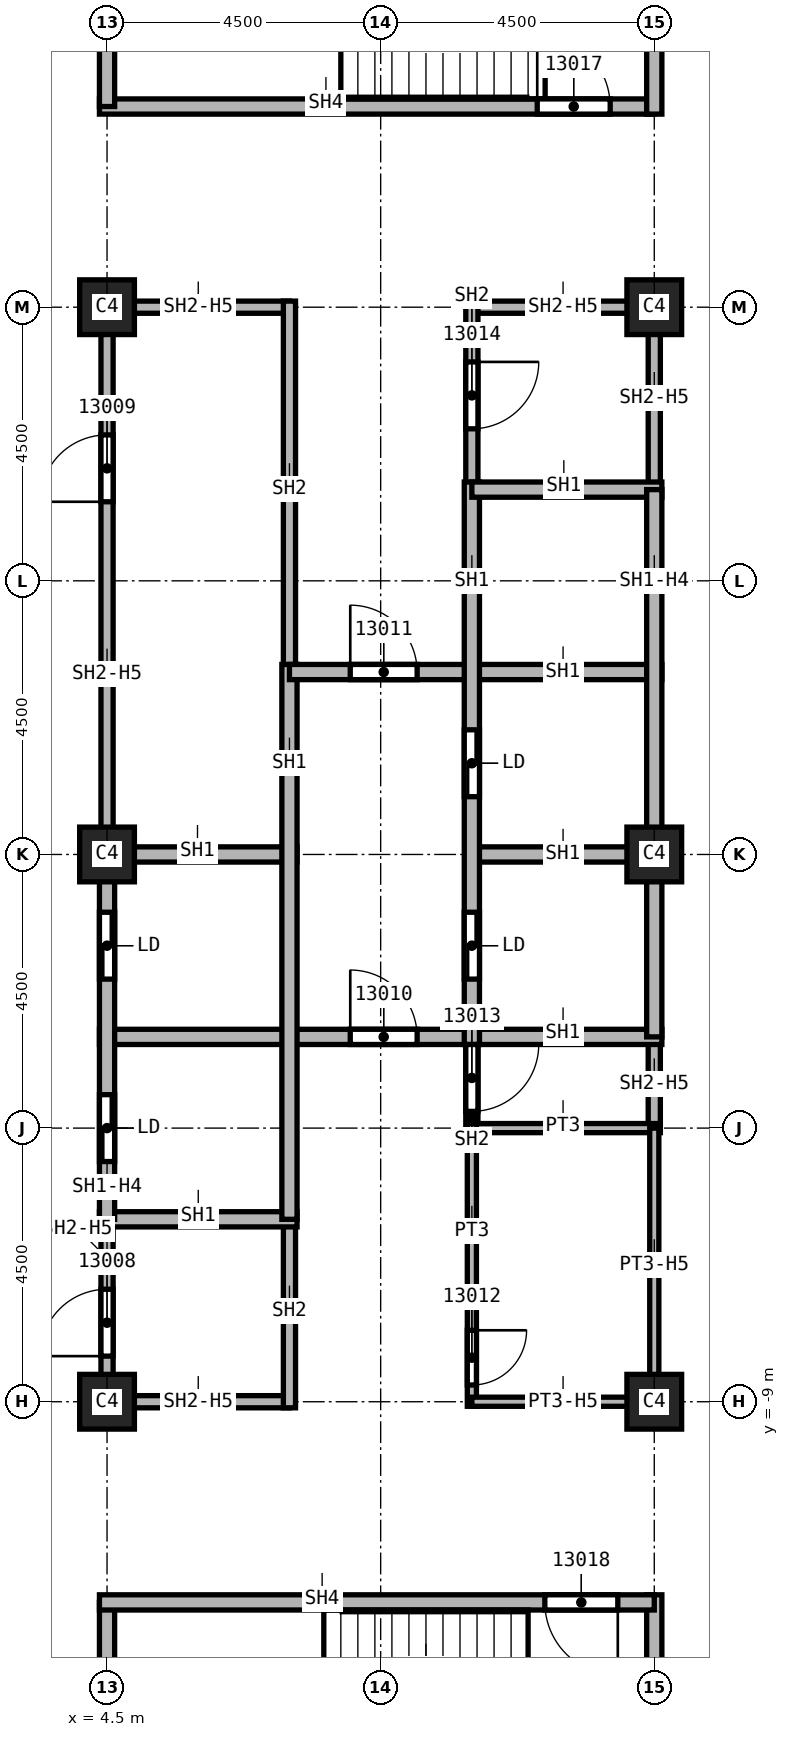
"""IFC4 building model, lengths in metres.
Left out: names, types, materials, properties, quantities, classifications, styles, units other than length and angle.
Written with IfcOpenShell. Run it as: python <this file> out.ifc"""

import sys

from ifc_helpers import new_model, si_unit, direction, frame, frame_2d, origin, origin_2d, place, context, subcontext, project, spatial, rectangle, extrude, element, fill, save


model = new_model("IFC4")
c1 = context("Model", 3, precision=1e-05, world=origin(), true_north=direction((0.0, 1.0)))
c2 = subcontext(c1, "Body", "Model", "MODEL_VIEW")
j1 = project(units=[si_unit("LENGTHUNIT", "METRE"), si_unit("PLANEANGLEUNIT", "RADIAN")], contexts=[c1])
p1 = place(None, origin())
s1 = spatial("IfcSite", under=j1, at=p1, CompositionType="ELEMENT")
p2 = place(p1, origin())
s2 = spatial("IfcBuilding", under=s1, at=p2, CompositionType="ELEMENT")
p3 = place(p2, frame((0.0, 0.0, 208.0)))
s3 = spatial("IfcBuildingStorey", under=s2, at=p3, CompositionType="ELEMENT", Elevation=208.0)
for number, where, z_axis, x_axis in (
    (1, (4.5, 0.0, 0.0), (0.0, 0.0, 1.0), (1.0, 0.0, 0.0)),
    (2, (4.5, 9.0, 0.0), (0.0, 0.0, 1.0), (1.0, 0.0, 0.0)),
    (3, (4.5, -9.0, 0.0), (0.0, 0.0, 1.0), (1.0, 0.0, 0.0)),
    (4, (13.5, 0.0, 0.0), (0.0, 0.0, 1.0), (1.0, 0.0, 0.0)),
    (5, (13.5, 9.0, 0.0), (0.0, 0.0, 1.0), (1.0, 0.0, 0.0)),
    (6, (13.5, -9.0, 0.0), (0.0, 0.0, 1.0), (1.0, 0.0, 0.0)),
):
    element("IfcColumn", number, at=place(p3, frame(where, z_axis=z_axis, x_axis=x_axis)), inside=s3, PredefinedType="COLUMN", context=c2, shape_type="SweptSolid", body=[
        extrude(rectangle(XDim=0.9, YDim=0.9, at=origin_2d()), origin(), (0.0, 0.0, 1.0), 3.72),
    ])
p4 = place(p3, frame((4.5, -9.1, 0.0), z_axis=(0.0, 0.0, 1.0), x_axis=(0.0, 1.0, 0.0)))
e7 = element("IfcWall", 7, at=p4, inside=s3, PredefinedType="SOLIDWALL", context=c2, shape_type="SweptSolid", body=[
    extrude(rectangle(XDim=3.1, YDim=0.2, at=frame_2d((1.55, 0.0))), origin(), (0.0, 0.0, 1.0), 2.958),
])
p5 = place(p4, frame((0.85, 0.0, 0.0)))
e8 = element("IfcOpeningElement", 8, at=p5, cuts=e7, PredefinedType="OPENING", context=c2, shape_type="SweptSolid", body=[
    extrude(rectangle(XDim=1.1, YDim=2.1, at=frame_2d((0.55, 1.05))), frame((0.0, 0.1, 0.0), z_axis=(0.0, -1.0, 0.0), x_axis=(1.0, 0.0, 0.0)), (0.0, 0.0, 1.0), 0.2),
])
p6 = place(p3, frame((4.5, 0.0, 0.0), z_axis=(0.0, 0.0, 1.0), x_axis=(0.0, 1.0, 0.0)))
e9 = element("IfcWall", 9, at=p6, inside=s3, PredefinedType="SOLIDWALL", context=c2, shape_type="SweptSolid", body=[
    extrude(rectangle(XDim=9.1, YDim=0.2, at=frame_2d((4.55, 0.0))), origin(), (0.0, 0.0, 1.0), 2.958),
])
p7 = place(p6, frame((5.8, 0.0, 0.0)))
e10 = element("IfcOpeningElement", 10, at=p7, cuts=e9, PredefinedType="OPENING", context=c2, shape_type="SweptSolid", body=[
    extrude(rectangle(XDim=1.1, YDim=2.1, at=frame_2d((0.55, 1.05))), frame((0.0, 0.1, 0.0), z_axis=(0.0, -1.0, 0.0), x_axis=(1.0, 0.0, 0.0)), (0.0, 0.0, 1.0), 0.2),
])
for number, where, z_axis, x_axis in (
    (11, (4.5, 9.0, 0.0), (0.0, 0.0, 1.0), (1.0, 0.0, 0.0)),
    (12, (7.5, -9.0, 0.0), (0.0, 0.0, 1.0), (-1.0, 0.0, 0.0)),
):
    element("IfcWall", number, at=place(p3, frame(where, z_axis=z_axis, x_axis=x_axis)), inside=s3, PredefinedType="SOLIDWALL", context=c2, shape_type="SweptSolid", body=[
        extrude(rectangle(XDim=3.0, YDim=0.2, at=frame_2d((1.5, 0.0))), origin(), (0.0, 0.0, 1.0), 2.958),
    ])
p8 = place(p3, frame((7.5, -6.0, 0.0), z_axis=(0.0, 0.0, 1.0), x_axis=(0.0, -1.0, 0.0)))
e13 = element("IfcWall", 13, at=p8, inside=s3, PredefinedType="SOLIDWALL", context=c2, shape_type="SweptSolid", body=[
    extrude(rectangle(XDim=3.1, YDim=0.2, at=frame_2d((1.55, 0.0))), origin(), (0.0, 0.0, 1.0), 3.72),
])
p9 = place(p3, frame((7.5, 9.1, 0.0), z_axis=(0.0, 0.0, 1.0), x_axis=(0.0, -1.0, 0.0)))
e14 = element("IfcWall", 14, at=p9, inside=s3, PredefinedType="SOLIDWALL", context=c2, shape_type="SweptSolid", body=[
    extrude(rectangle(XDim=6.225, YDim=0.2, at=frame_2d((3.113, 0.0))), origin(), (0.0, 0.0, 1.0), 3.72),
])
p10 = place(p3, frame((10.5, -2.875, 0.0), z_axis=(0.0, 0.0, 1.0), x_axis=(0.0, -1.0, 0.0)))
e15 = element("IfcWall", 15, at=p10, inside=s3, PredefinedType="SOLIDWALL", context=c2, shape_type="SweptSolid", body=[
    extrude(rectangle(XDim=1.7, YDim=0.2, at=frame_2d((0.85, 0.0))), origin(), (0.0, 0.0, 1.0), 3.72),
])
p11 = place(p10, frame((0.25, 0.0, 0.0)))
e16 = element("IfcOpeningElement", 16, at=p11, cuts=e15, PredefinedType="OPENING", context=c2, shape_type="SweptSolid", body=[
    extrude(rectangle(XDim=1.1, YDim=2.1, at=frame_2d((0.55, 1.05))), frame((0.0, 0.1, 0.0), z_axis=(0.0, -1.0, 0.0), x_axis=(1.0, 0.0, 0.0)), (0.0, 0.0, 1.0), 0.2),
])
p12 = place(p3, frame((10.5, 9.0, 0.0), z_axis=(0.0, 0.0, 1.0), x_axis=(1.0, 0.0, 0.0)))
e17 = element("IfcWall", 17, at=p12, inside=s3, PredefinedType="SOLIDWALL", context=c2, shape_type="SweptSolid", body=[
    extrude(rectangle(XDim=3.0, YDim=0.2, at=frame_2d((1.5, 0.0))), origin(), (0.0, 0.0, 1.0), 2.958),
])
p13 = place(p3, frame((10.5, 9.1, 0.0), z_axis=(0.0, 0.0, 1.0), x_axis=(0.0, -1.0, 0.0)))
e18 = element("IfcWall", 18, at=p13, inside=s3, PredefinedType="SOLIDWALL", context=c2, shape_type="SweptSolid", body=[
    extrude(rectangle(XDim=3.225, YDim=0.2, at=frame_2d((1.613, 0.0))), origin(), (0.0, 0.0, 1.0), 3.72),
])
p14 = place(p13, frame((1.0, 0.0, 0.0)))
e19 = element("IfcOpeningElement", 19, at=p14, cuts=e18, PredefinedType="OPENING", context=c2, shape_type="SweptSolid", body=[
    extrude(rectangle(XDim=1.1, YDim=2.1, at=frame_2d((0.55, 1.05))), frame((0.0, 0.1, 0.0), z_axis=(0.0, -1.0, 0.0), x_axis=(1.0, 0.0, 0.0)), (0.0, 0.0, 1.0), 0.2),
])
p15 = place(p3, frame((13.5, -3.0, 0.0), z_axis=(0.0, 0.0, 1.0), x_axis=(0.0, -1.0, 0.0)))
e20 = element("IfcWall", 20, at=p15, inside=s3, PredefinedType="SOLIDWALL", context=c2, shape_type="SweptSolid", body=[
    extrude(rectangle(XDim=1.5, YDim=0.2, at=frame_2d((0.75, 0.0))), origin(), (0.0, 0.0, 1.0), 2.958),
])
p16 = place(p3, frame((13.5, 9.1, 0.0), z_axis=(0.0, 0.0, 1.0), x_axis=(0.0, -1.0, 0.0)))
e21 = element("IfcWall", 21, at=p16, inside=s3, PredefinedType="SOLIDWALL", context=c2, shape_type="SweptSolid", body=[
    extrude(rectangle(XDim=3.1, YDim=0.2, at=frame_2d((1.55, 0.0))), origin(), (0.0, 0.0, 1.0), 2.958),
])
p17 = place(p3, frame((4.375, -6.0, 0.0), z_axis=(0.0, 0.0, 1.0), x_axis=(1.0, 0.0, 0.0)))
e22 = element("IfcWall", 22, at=p17, inside=s3, PredefinedType="SOLIDWALL", context=c2, shape_type="SweptSolid", body=[
    extrude(rectangle(XDim=3.25, YDim=0.25, at=frame_2d((1.625, 0.0))), origin(), (0.0, 0.0, 1.0), 3.72),
])
p18 = place(p3, frame((4.375, -3.0, 0.0), z_axis=(0.0, 0.0, 1.0), x_axis=(1.0, 0.0, 0.0)))
e23 = element("IfcWall", 23, at=p18, inside=s3, PredefinedType="SOLIDWALL", context=c2, shape_type="SweptSolid", body=[
    extrude(rectangle(XDim=9.25, YDim=0.25, at=frame_2d((4.625, 0.0))), origin(), (0.0, 0.0, 1.0), 3.72),
])
p19 = place(p18, frame((4.125, 0.0, 0.0)))
e24 = element("IfcOpeningElement", 24, at=p19, cuts=e23, PredefinedType="OPENING", context=c2, shape_type="SweptSolid", body=[
    extrude(rectangle(XDim=1.1, YDim=2.1, at=frame_2d((0.55, 1.05))), frame((0.0, 0.125, 0.0), z_axis=(0.0, -1.0, 0.0), x_axis=(1.0, 0.0, 0.0)), (0.0, 0.0, 1.0), 0.25),
])
p20 = place(p3, frame((4.375, 0.0, 0.0), z_axis=(0.0, 0.0, 1.0), x_axis=(1.0, 0.0, 0.0)))
e25 = element("IfcWall", 25, at=p20, inside=s3, PredefinedType="SOLIDWALL", context=c2, shape_type="SweptSolid", body=[
    extrude(rectangle(XDim=3.25, YDim=0.25, at=frame_2d((1.625, 0.0))), origin(), (0.0, 0.0, 1.0), 3.72),
])
p21 = place(p3, frame((4.5, -6.0, 0.0), z_axis=(0.0, 0.0, 1.0), x_axis=(0.0, 1.0, 0.0)))
e26 = element("IfcWall", 26, at=p21, inside=s3, PredefinedType="SOLIDWALL", context=c2, shape_type="SweptSolid", body=[
    extrude(rectangle(XDim=6.0, YDim=0.25, at=frame_2d((3.0, 0.0))), origin(), (0.0, 0.0, 1.0), 2.958),
])
p22 = place(p21, frame((0.95, 0.0, 0.0)))
e27 = element("IfcOpeningElement", 27, at=p22, cuts=e26, PredefinedType="OPENING", context=c2, shape_type="SweptSolid", body=[
    extrude(rectangle(XDim=1.1, YDim=2.1, at=frame_2d((0.55, 1.05))), frame((0.0, 0.125, 0.0), z_axis=(0.0, -1.0, 0.0), x_axis=(1.0, 0.0, 0.0)), (0.0, 0.0, 1.0), 0.25),
])
p23 = place(p21, frame((3.95, 0.0, 0.0)))
e28 = element("IfcOpeningElement", 28, at=p23, cuts=e26, PredefinedType="OPENING", context=c2, shape_type="SweptSolid", body=[
    extrude(rectangle(XDim=1.1, YDim=2.1, at=frame_2d((0.55, 1.05))), frame((0.0, 0.125, 0.0), z_axis=(0.0, -1.0, 0.0), x_axis=(1.0, 0.0, 0.0)), (0.0, 0.0, 1.0), 0.25),
])
p24 = place(p3, frame((7.5, 3.125, 0.0), z_axis=(0.0, 0.0, 1.0), x_axis=(0.0, -1.0, 0.0)))
e29 = element("IfcWall", 29, at=p24, inside=s3, PredefinedType="SOLIDWALL", context=c2, shape_type="SweptSolid", body=[
    extrude(rectangle(XDim=9.125, YDim=0.25, at=frame_2d((4.562, 0.0))), origin(), (0.0, 0.0, 1.0), 3.72),
])
p25 = place(p3, frame((7.5, 3.0, 0.0), z_axis=(0.0, 0.0, 1.0), x_axis=(1.0, 0.0, 0.0)))
e30 = element("IfcWall", 30, at=p25, inside=s3, PredefinedType="SOLIDWALL", context=c2, shape_type="SweptSolid", body=[
    extrude(rectangle(XDim=6.125, YDim=0.25, at=frame_2d((3.062, 0.0))), origin(), (0.0, 0.0, 1.0), 3.72),
])
p26 = place(p25, frame((1.0, 0.0, 0.0)))
e31 = element("IfcOpeningElement", 31, at=p26, cuts=e30, PredefinedType="OPENING", context=c2, shape_type="SweptSolid", body=[
    extrude(rectangle(XDim=1.1, YDim=2.1, at=frame_2d((0.55, 1.05))), frame((0.0, 0.125, 0.0), z_axis=(0.0, -1.0, 0.0), x_axis=(1.0, 0.0, 0.0)), (0.0, 0.0, 1.0), 0.25),
])
p27 = place(p3, frame((10.5, 0.0, 0.0), z_axis=(0.0, 0.0, 1.0), x_axis=(1.0, 0.0, 0.0)))
e32 = element("IfcWall", 32, at=p27, inside=s3, PredefinedType="SOLIDWALL", context=c2, shape_type="SweptSolid", body=[
    extrude(rectangle(XDim=3.125, YDim=0.25, at=frame_2d((1.562, 0.0))), origin(), (0.0, 0.0, 1.0), 3.72),
])
p28 = place(p3, frame((10.5, 6.125, 0.0), z_axis=(0.0, 0.0, 1.0), x_axis=(0.0, -1.0, 0.0)))
e33 = element("IfcWall", 33, at=p28, inside=s3, PredefinedType="SOLIDWALL", context=c2, shape_type="SweptSolid", body=[
    extrude(rectangle(XDim=9.25, YDim=0.25, at=frame_2d((4.625, 0.0))), origin(), (0.0, 0.0, 1.0), 3.72),
])
p29 = place(p28, frame((7.075, 0.0, 0.0)))
e34 = element("IfcOpeningElement", 34, at=p29, cuts=e33, PredefinedType="OPENING", context=c2, shape_type="SweptSolid", body=[
    extrude(rectangle(XDim=1.1, YDim=2.1, at=frame_2d((0.55, 1.05))), frame((0.0, 0.125, 0.0), z_axis=(0.0, -1.0, 0.0), x_axis=(1.0, 0.0, 0.0)), (0.0, 0.0, 1.0), 0.25),
])
p30 = place(p28, frame((4.075, 0.0, 0.0)))
e35 = element("IfcOpeningElement", 35, at=p30, cuts=e33, PredefinedType="OPENING", context=c2, shape_type="SweptSolid", body=[
    extrude(rectangle(XDim=1.1, YDim=2.1, at=frame_2d((0.55, 1.05))), frame((0.0, 0.125, 0.0), z_axis=(0.0, -1.0, 0.0), x_axis=(1.0, 0.0, 0.0)), (0.0, 0.0, 1.0), 0.25),
])
p31 = place(p3, frame((10.5, 6.0, 0.0), z_axis=(0.0, 0.0, 1.0), x_axis=(1.0, 0.0, 0.0)))
e36 = element("IfcWall", 36, at=p31, inside=s3, PredefinedType="SOLIDWALL", context=c2, shape_type="SweptSolid", body=[
    extrude(rectangle(XDim=3.125, YDim=0.25, at=frame_2d((1.562, 0.0))), origin(), (0.0, 0.0, 1.0), 3.72),
])
p32 = place(p3, frame((13.5, 6.0, 0.0), z_axis=(0.0, 0.0, 1.0), x_axis=(0.0, -1.0, 0.0)))
e37 = element("IfcWall", 37, at=p32, inside=s3, PredefinedType="SOLIDWALL", context=c2, shape_type="SweptSolid", body=[
    extrude(rectangle(XDim=9.0, YDim=0.25, at=frame_2d((4.5, 0.0))), origin(), (0.0, 0.0, 1.0), 2.958),
])
p33 = place(p3, frame((4.375, 12.3, 0.0), z_axis=(0.0, 0.0, 1.0), x_axis=(1.0, 0.0, 0.0)))
e38 = element("IfcWall", 38, at=p33, inside=s3, PredefinedType="SOLIDWALL", context=c2, shape_type="SweptSolid", body=[
    extrude(rectangle(XDim=9.125, YDim=0.25, at=frame_2d((4.562, 0.0))), origin(), (0.0, 0.0, 1.0), 3.72),
])
p34 = place(p33, frame((7.2, 0.0, 0.0)))
e39 = element("IfcOpeningElement", 39, at=p34, cuts=e38, PredefinedType="OPENING", context=c2, shape_type="SweptSolid", body=[
    extrude(rectangle(XDim=1.2, YDim=2.1, at=frame_2d((0.6, 1.05))), frame((0.0, 0.125, 0.0), z_axis=(0.0, -1.0, 0.0), x_axis=(1.0, 0.0, 0.0)), (0.0, 0.0, 1.0), 0.25),
])
for number, where, z_axis, x_axis in (
    (40, (4.5, -16.8, 0.0), (0.0, 0.0, 1.0), (0.0, 1.0, 0.0)),
    (41, (4.5, 12.3, 0.0), (0.0, 0.0, 1.0), (0.0, 1.0, 0.0)),
):
    element("IfcWall", number, at=place(p3, frame(where, z_axis=z_axis, x_axis=x_axis)), inside=s3, PredefinedType="SOLIDWALL", context=c2, shape_type="SweptSolid", body=[
        extrude(rectangle(XDim=4.5, YDim=0.25, at=frame_2d((2.25, 0.0))), origin(), (0.0, 0.0, 1.0), 3.72),
    ])
p35 = place(p3, frame((13.5, -16.925, 0.0), z_axis=(0.0, 0.0, 1.0), x_axis=(0.0, 1.0, 0.0)))
e42 = element("IfcWall", 42, at=p35, inside=s3, PredefinedType="SOLIDWALL", context=c2, shape_type="SweptSolid", body=[
    extrude(rectangle(XDim=4.75, YDim=0.25, at=frame_2d((2.375, 0.0))), origin(), (0.0, 0.0, 1.0), 3.72),
])
p36 = place(p3, frame((13.5, -12.3, 0.0), z_axis=(0.0, 0.0, 1.0), x_axis=(-1.0, 0.0, 0.0)))
e43 = element("IfcWall", 43, at=p36, inside=s3, PredefinedType="SOLIDWALL", context=c2, shape_type="SweptSolid", body=[
    extrude(rectangle(XDim=9.125, YDim=0.25, at=frame_2d((4.562, 0.0))), origin(), (0.0, 0.0, 1.0), 3.72),
])
p37 = place(p36, frame((0.6, 0.0, 0.0)))
e44 = element("IfcOpeningElement", 44, at=p37, cuts=e43, PredefinedType="OPENING", context=c2, shape_type="SweptSolid", body=[
    extrude(rectangle(XDim=1.2, YDim=2.1, at=frame_2d((0.6, 1.05))), frame((0.0, 0.125, 0.0), z_axis=(0.0, -1.0, 0.0), x_axis=(1.0, 0.0, 0.0)), (0.0, 0.0, 1.0), 0.25),
])
p38 = place(p3, frame((13.5, 12.175, 0.0), z_axis=(0.0, 0.0, 1.0), x_axis=(0.0, 1.0, 0.0)))
e45 = element("IfcWall", 45, at=p38, inside=s3, PredefinedType="SOLIDWALL", context=c2, shape_type="SweptSolid", body=[
    extrude(rectangle(XDim=4.75, YDim=0.25, at=frame_2d((2.375, 0.0))), origin(), (0.0, 0.0, 1.0), 3.72),
])
p39 = place(p3, frame((10.5, -4.5, 0.0), z_axis=(0.0, 0.0, 1.0), x_axis=(1.0, 0.0, 0.0)))
e46 = element("IfcWall", 46, at=p39, inside=s3, PredefinedType="PARTITIONING", context=c2, shape_type="SweptSolid", body=[
    extrude(rectangle(XDim=3.1, YDim=0.15, at=frame_2d((1.55, 0.0))), origin(), (0.0, 0.0, 1.0), 3.72),
])
p40 = place(p3, frame((10.5, -4.425, 0.0), z_axis=(0.0, 0.0, 1.0), x_axis=(0.0, -1.0, 0.0)))
e47 = element("IfcWall", 47, at=p40, inside=s3, PredefinedType="PARTITIONING", context=c2, shape_type="SweptSolid", body=[
    extrude(rectangle(XDim=4.65, YDim=0.15, at=frame_2d((2.325, 0.0))), origin(), (0.0, 0.0, 1.0), 3.72),
])
p41 = place(p40, frame((3.4, 0.0, 0.0)))
e48 = element("IfcOpeningElement", 48, at=p41, cuts=e47, PredefinedType="OPENING", context=c2, shape_type="SweptSolid", body=[
    extrude(rectangle(XDim=0.9, YDim=2.1, at=frame_2d((0.45, 1.05))), frame((0.0, 0.075, 0.0), z_axis=(0.0, -1.0, 0.0), x_axis=(1.0, 0.0, 0.0)), (0.0, 0.0, 1.0), 0.15),
])
p42 = place(p3, frame((13.5, -9.0, 0.0), z_axis=(0.0, 0.0, 1.0), x_axis=(-1.0, 0.0, 0.0)))
e49 = element("IfcWall", 49, at=p42, inside=s3, PredefinedType="PARTITIONING", context=c2, shape_type="SweptSolid", body=[
    extrude(rectangle(XDim=3.0, YDim=0.15, at=frame_2d((1.5, 0.0))), origin(), (0.0, 0.0, 1.0), 2.958),
])
p43 = place(p3, frame((13.5, -4.5, 0.0), z_axis=(0.0, 0.0, 1.0), x_axis=(0.0, -1.0, 0.0)))
e50 = element("IfcWall", 50, at=p43, inside=s3, PredefinedType="PARTITIONING", context=c2, shape_type="SweptSolid", body=[
    extrude(rectangle(XDim=4.575, YDim=0.15, at=frame_2d((2.288, 0.0))), origin(), (0.0, 0.0, 1.0), 2.958),
])
p44 = place(p5, origin())
e51 = element("IfcDoor", 51, at=p44, inside=s3, OperationType="SINGLE_SWING_LEFT", PredefinedType="DOOR", context=c2, shape_type="SweptSolid", body=[
    extrude(rectangle(XDim=1.1, YDim=2.1, at=frame_2d((0.55, 1.05))), frame((0.0, 0.025, 0.0), z_axis=(0.0, -1.0, 0.0), x_axis=(1.0, 0.0, 0.0)), (0.0, 0.0, 1.0), 0.05),
])
fill(e8, e51)
p45 = place(p7, origin())
e52 = element("IfcDoor", 52, at=p45, inside=s3, OperationType="SINGLE_SWING_RIGHT", PredefinedType="DOOR", context=c2, shape_type="SweptSolid", body=[
    extrude(rectangle(XDim=1.1, YDim=2.1, at=frame_2d((0.55, 1.05))), frame((0.0, 0.025, 0.0), z_axis=(0.0, -1.0, 0.0), x_axis=(1.0, 0.0, 0.0)), (0.0, 0.0, 1.0), 0.05),
])
fill(e10, e52)
p46 = place(p19, origin())
e53 = element("IfcDoor", 53, at=p46, inside=s3, OperationType="SINGLE_SWING_LEFT", PredefinedType="DOOR", context=c2, shape_type="SweptSolid", body=[
    extrude(rectangle(XDim=1.1, YDim=2.1, at=frame_2d((0.55, 1.05))), frame((0.0, 0.025, 0.0), z_axis=(0.0, -1.0, 0.0), x_axis=(1.0, 0.0, 0.0)), (0.0, 0.0, 1.0), 0.05),
])
fill(e24, e53)
p47 = place(p26, origin())
e54 = element("IfcDoor", 54, at=p47, inside=s3, OperationType="SINGLE_SWING_RIGHT", PredefinedType="DOOR", context=c2, shape_type="SweptSolid", body=[
    extrude(rectangle(XDim=1.1, YDim=2.1, at=frame_2d((0.55, 1.05))), frame((0.0, 0.025, 0.0), z_axis=(0.0, -1.0, 0.0), x_axis=(1.0, 0.0, 0.0)), (0.0, 0.0, 1.0), 0.05),
])
fill(e31, e54)
p48 = place(p41, origin())
e55 = element("IfcDoor", 55, at=p48, inside=s3, OperationType="SINGLE_SWING_LEFT", PredefinedType="DOOR", context=c2, shape_type="SweptSolid", body=[
    extrude(rectangle(XDim=0.9, YDim=2.1, at=frame_2d((0.45, 1.05))), frame((0.0, 0.025, 0.0), z_axis=(0.0, -1.0, 0.0), x_axis=(1.0, 0.0, 0.0)), (0.0, 0.0, 1.0), 0.05),
])
fill(e48, e55)
p49 = place(p11, origin())
e56 = element("IfcDoor", 56, at=p49, inside=s3, OperationType="SINGLE_SWING_RIGHT", PredefinedType="DOOR", context=c2, shape_type="SweptSolid", body=[
    extrude(rectangle(XDim=1.1, YDim=2.1, at=frame_2d((0.55, 1.05))), frame((0.0, 0.025, 0.0), z_axis=(0.0, -1.0, 0.0), x_axis=(1.0, 0.0, 0.0)), (0.0, 0.0, 1.0), 0.05),
])
fill(e16, e56)
p50 = place(p14, origin())
e57 = element("IfcDoor", 57, at=p50, inside=s3, OperationType="SINGLE_SWING_LEFT", PredefinedType="DOOR", context=c2, shape_type="SweptSolid", body=[
    extrude(rectangle(XDim=1.1, YDim=2.1, at=frame_2d((0.55, 1.05))), frame((0.0, 0.025, 0.0), z_axis=(0.0, -1.0, 0.0), x_axis=(1.0, 0.0, 0.0)), (0.0, 0.0, 1.0), 0.05),
])
fill(e19, e57)
p51 = place(p34, origin())
e58 = element("IfcDoor", 58, at=p51, inside=s3, OperationType="SINGLE_SWING_RIGHT", PredefinedType="DOOR", context=c2, shape_type="SweptSolid", body=[
    extrude(rectangle(XDim=1.2, YDim=2.1, at=frame_2d((0.6, 1.05))), frame((0.0, 0.025, 0.0), z_axis=(0.0, -1.0, 0.0), x_axis=(1.0, 0.0, 0.0)), (0.0, 0.0, 1.0), 0.05),
])
fill(e39, e58)
p52 = place(p37, origin())
e59 = element("IfcDoor", 59, at=p52, inside=s3, OperationType="SINGLE_SWING_LEFT", PredefinedType="DOOR", context=c2, shape_type="SweptSolid", body=[
    extrude(rectangle(XDim=1.2, YDim=2.1, at=frame_2d((0.6, 1.05))), frame((0.0, 0.025, 0.0), z_axis=(0.0, -1.0, 0.0), x_axis=(1.0, 0.0, 0.0)), (0.0, 0.0, 1.0), 0.05),
])
fill(e44, e59)
p53 = place(p22, origin())
e60 = element("IfcDoor", 60, at=p53, inside=s3, OperationType="SLIDING_TO_LEFT", PredefinedType="DOOR", context=c2, shape_type="SweptSolid", body=[
    extrude(rectangle(XDim=1.1, YDim=2.1, at=frame_2d((0.55, 1.05))), frame((0.0, 0.025, 0.0), z_axis=(0.0, -1.0, 0.0), x_axis=(1.0, 0.0, 0.0)), (0.0, 0.0, 1.0), 0.05),
])
fill(e27, e60)
p54 = place(p23, origin())
e61 = element("IfcDoor", 61, at=p54, inside=s3, OperationType="SLIDING_TO_LEFT", PredefinedType="DOOR", context=c2, shape_type="SweptSolid", body=[
    extrude(rectangle(XDim=1.1, YDim=2.1, at=frame_2d((0.55, 1.05))), frame((0.0, 0.025, 0.0), z_axis=(0.0, -1.0, 0.0), x_axis=(1.0, 0.0, 0.0)), (0.0, 0.0, 1.0), 0.05),
])
fill(e28, e61)
p55 = place(p29, origin())
e62 = element("IfcDoor", 62, at=p55, inside=s3, OperationType="SLIDING_TO_LEFT", PredefinedType="DOOR", context=c2, shape_type="SweptSolid", body=[
    extrude(rectangle(XDim=1.1, YDim=2.1, at=frame_2d((0.55, 1.05))), frame((0.0, 0.025, 0.0), z_axis=(0.0, -1.0, 0.0), x_axis=(1.0, 0.0, 0.0)), (0.0, 0.0, 1.0), 0.05),
])
fill(e34, e62)
p56 = place(p30, origin())
e63 = element("IfcDoor", 63, at=p56, inside=s3, OperationType="SLIDING_TO_LEFT", PredefinedType="DOOR", context=c2, shape_type="SweptSolid", body=[
    extrude(rectangle(XDim=1.1, YDim=2.1, at=frame_2d((0.55, 1.05))), frame((0.0, 0.025, 0.0), z_axis=(0.0, -1.0, 0.0), x_axis=(1.0, 0.0, 0.0)), (0.0, 0.0, 1.0), 0.05),
])
fill(e35, e63)
save(model, sys.argv[1])
